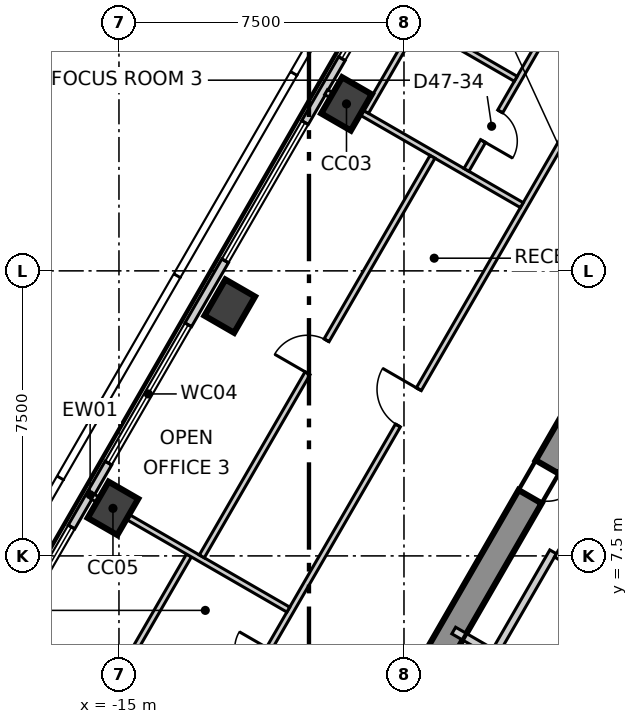
"""IFC4 building model, lengths in metres.
Left out: names, types, materials, properties, quantities, classifications, styles, units other than length and angle.
Written with IfcOpenShell. Run it as: python <this file> out.ifc"""

import sys

from ifc_helpers import new_model, si_unit, direction, frame, frame_2d, origin, origin_2d, place, context, subcontext, project, spatial, polyline, rectangle, outline, extrude, element, fill, save


model = new_model("IFC4")
c1 = context("Model", 3, precision=1e-05, world=origin(), true_north=direction((0.0, 1.0)))
c2 = subcontext(c1, "Body", "Model", "MODEL_VIEW")
j1 = project(units=[si_unit("LENGTHUNIT", "METRE"), si_unit("PLANEANGLEUNIT", "RADIAN")], contexts=[c1])
p1 = place(None, origin())
s1 = spatial("IfcSite", under=j1, at=p1, CompositionType="ELEMENT")
p2 = place(p1, origin())
s2 = spatial("IfcBuilding", under=s1, at=p2, CompositionType="ELEMENT")
p3 = place(p2, frame((0.0, 0.0, 203.3)))
s3 = spatial("IfcBuildingStorey", under=s2, at=p3, CompositionType="ELEMENT", Elevation=203.3)
p4 = place(p3, frame((-1.703, 13.35, -0.3), z_axis=(0.0, 0.0, 1.0), x_axis=(-0.500011533395, -0.866018744874, 0.0)))
e1 = element("IfcWall", 1, at=p4, inside=s3, PredefinedType="SHEAR", context=c2, shape_type="SweptSolid", body=[
    extrude(outline(polyline([(-0.202, -0.35), (1.782, -0.35), (3.766, -0.35), (5.75, -0.35), (7.734, -0.35), (9.718, -0.35), (11.702, -0.35), (13.686, -0.35), (15.67, -0.35), (17.654, -0.35), (19.638, -0.35), (21.622, -0.35), (21.218, 0.35), (19.307, 0.35), (17.397, 0.35), (15.486, 0.35), (13.576, 0.35), (11.665, 0.35), (9.755, 0.35), (7.844, 0.35), (5.934, 0.35), (4.023, 0.35), (2.113, 0.35), (0.202, 0.35), (-0.202, -0.35)])), origin(), (0.0, 0.0, 1.0), 4.0),
])
p5 = place(p4, frame((10.16, 0.0, 0.3)))
e2 = element("IfcOpeningElement", 2, at=p5, cuts=e1, PredefinedType="OPENING", context=c2, shape_type="SweptSolid", body=[
    extrude(rectangle(XDim=1.1, YDim=2.1, at=frame_2d((0.55, 1.05))), frame((0.0, 0.36, 0.0), z_axis=(0.0, -1.0, 0.0), x_axis=(1.0, 0.0, 0.0)), (0.0, 0.0, 1.0), 0.72),
])
p6 = place(p4, frame((4.055, 0.0, 0.3)))
e3 = element("IfcOpeningElement", 3, at=p6, cuts=e1, PredefinedType="OPENING", context=c2, shape_type="SweptSolid", body=[
    extrude(rectangle(XDim=0.9, YDim=2.1, at=frame_2d((0.45, 1.05))), frame((0.0, 0.36, 0.0), z_axis=(0.0, -1.0, 0.0), x_axis=(1.0, 0.0, 0.0)), (0.0, 0.0, 1.0), 0.72),
])
for number, where, z_axis, x_axis in (
    (4, (-9.013, 19.393, -0.3), (0.0, 0.0, 1.0), (0.5, 0.866, 0.0)),
    (5, (-12.085, 14.072, -0.3), (0.0, 0.0, 1.0), (0.5, 0.866, 0.0)),
    (6, (-15.158, 8.751, -0.3), (0.0, 0.0, 1.0), (0.5, 0.866, 0.0)),
):
    element("IfcColumn", number, at=place(p3, frame(where, z_axis=z_axis, x_axis=x_axis)), inside=s3, PredefinedType="COLUMN", context=c2, shape_type="SweptSolid", body=[
        extrude(rectangle(XDim=1.1, YDim=0.9, at=origin_2d()), origin(), (0.0, 0.0, 1.0), 4.0),
    ])
p7 = place(p3, frame((-2.824, 31.513, 0.0), z_axis=(0.0, 0.0, 1.0), x_axis=(-0.500012324412, -0.866018288165, 0.0)))
e7 = element("IfcWall", 7, at=p7, inside=s3, PredefinedType="ELEMENTEDWALL", context=c2, shape_type="SweptSolid", body=[
    extrude(rectangle(XDim=51.739, YDim=0.2, at=frame_2d((25.87, 0.0))), origin(), (0.0, 0.0, 1.0), 3.7),
])
p8 = place(p7, frame((2.275, 0.0, 0.9)))
e8 = element("IfcOpeningElement", 8, at=p8, cuts=e7, PredefinedType="OPENING", context=c2, shape_type="SweptSolid", body=[
    extrude(rectangle(XDim=4.2, YDim=2.5, at=frame_2d((2.1, 1.25))), frame((0.0, 0.11, 0.0), z_axis=(0.0, -1.0, 0.0), x_axis=(1.0, 0.0, 0.0)), (0.0, 0.0, 1.0), 0.22),
])
p9 = place(p7, frame((8.419, 0.0, 0.9)))
e9 = element("IfcOpeningElement", 9, at=p9, cuts=e7, PredefinedType="OPENING", context=c2, shape_type="SweptSolid", body=[
    extrude(rectangle(XDim=4.2, YDim=2.5, at=frame_2d((2.1, 1.25))), frame((0.0, 0.11, 0.0), z_axis=(0.0, -1.0, 0.0), x_axis=(1.0, 0.0, 0.0)), (0.0, 0.0, 1.0), 0.22),
])
p10 = place(p7, frame((14.563, 0.0, 0.9)))
e10 = element("IfcOpeningElement", 10, at=p10, cuts=e7, PredefinedType="OPENING", context=c2, shape_type="SweptSolid", body=[
    extrude(rectangle(XDim=4.2, YDim=2.5, at=frame_2d((2.1, 1.25))), frame((0.0, 0.11, 0.0), z_axis=(0.0, -1.0, 0.0), x_axis=(1.0, 0.0, 0.0)), (0.0, 0.0, 1.0), 0.22),
])
p11 = place(p7, frame((20.707, 0.0, 0.9)))
e11 = element("IfcOpeningElement", 11, at=p11, cuts=e7, PredefinedType="OPENING", context=c2, shape_type="SweptSolid", body=[
    extrude(rectangle(XDim=4.2, YDim=2.5, at=frame_2d((2.1, 1.25))), frame((0.0, 0.11, 0.0), z_axis=(0.0, -1.0, 0.0), x_axis=(1.0, 0.0, 0.0)), (0.0, 0.0, 1.0), 0.22),
])
p12 = place(p7, frame((26.851, 0.0, 0.9)))
e12 = element("IfcOpeningElement", 12, at=p12, cuts=e7, PredefinedType="OPENING", context=c2, shape_type="SweptSolid", body=[
    extrude(rectangle(XDim=4.2, YDim=2.5, at=frame_2d((2.1, 1.25))), frame((0.0, 0.11, 0.0), z_axis=(0.0, -1.0, 0.0), x_axis=(1.0, 0.0, 0.0)), (0.0, 0.0, 1.0), 0.22),
])
p13 = place(p7, frame((32.995, 0.0, 0.9)))
e13 = element("IfcOpeningElement", 13, at=p13, cuts=e7, PredefinedType="OPENING", context=c2, shape_type="SweptSolid", body=[
    extrude(rectangle(XDim=4.2, YDim=2.5, at=frame_2d((2.1, 1.25))), frame((0.0, 0.11, 0.0), z_axis=(0.0, -1.0, 0.0), x_axis=(1.0, 0.0, 0.0)), (0.0, 0.0, 1.0), 0.22),
])
p14 = place(p7, frame((39.14, 0.0, 0.9)))
e14 = element("IfcOpeningElement", 14, at=p14, cuts=e7, PredefinedType="OPENING", context=c2, shape_type="SweptSolid", body=[
    extrude(rectangle(XDim=4.2, YDim=2.5, at=frame_2d((2.1, 1.25))), frame((0.0, 0.11, 0.0), z_axis=(0.0, -1.0, 0.0), x_axis=(1.0, 0.0, 0.0)), (0.0, 0.0, 1.0), 0.22),
])
p15 = place(p7, frame((45.284, 0.0, 0.9)))
e15 = element("IfcOpeningElement", 15, at=p15, cuts=e7, PredefinedType="OPENING", context=c2, shape_type="SweptSolid", body=[
    extrude(rectangle(XDim=4.2, YDim=2.5, at=frame_2d((2.1, 1.25))), frame((0.0, 0.11, 0.0), z_axis=(0.0, -1.0, 0.0), x_axis=(1.0, 0.0, 0.0)), (0.0, 0.0, 1.0), 0.22),
])
p16 = place(p3, frame((-20.883, -11.97, 0.0), z_axis=(0.0, 0.0, 1.0), x_axis=(0.500006150555, 0.866021852731, 0.0)))
e16 = element("IfcWall", 16, at=p16, inside=s3, PredefinedType="PARTITIONING", context=c2, shape_type="SweptSolid", body=[
    extrude(rectangle(XDim=41.766, YDim=0.15, at=frame_2d((20.883, 0.0))), origin(), (0.0, 0.0, 1.0), 3.7),
])
p17 = place(p16, frame((36.916, 0.0, 0.0)))
e17 = element("IfcOpeningElement", 17, at=p17, cuts=e16, PredefinedType="OPENING", context=c2, shape_type="SweptSolid", body=[
    extrude(rectangle(XDim=1.1, YDim=2.1, at=frame_2d((0.55, 1.05))), frame((0.0, 0.085, 0.0), z_axis=(0.0, -1.0, 0.0), x_axis=(1.0, 0.0, 0.0)), (0.0, 0.0, 1.0), 0.17),
])
p18 = place(p16, frame((26.446, 0.0, 0.0)))
e18 = element("IfcOpeningElement", 18, at=p18, cuts=e16, PredefinedType="OPENING", context=c2, shape_type="SweptSolid", body=[
    extrude(rectangle(XDim=1.1, YDim=2.1, at=frame_2d((0.55, 1.05))), frame((0.0, 0.085, 0.0), z_axis=(0.0, -1.0, 0.0), x_axis=(1.0, 0.0, 0.0)), (0.0, 0.0, 1.0), 0.17),
])
p19 = place(p16, frame((9.757, 0.0, 0.0)))
e19 = element("IfcOpeningElement", 19, at=p19, cuts=e16, PredefinedType="OPENING", context=c2, shape_type="SweptSolid", body=[
    extrude(rectangle(XDim=1.1, YDim=2.1, at=frame_2d((0.55, 1.05))), frame((0.0, 0.085, 0.0), z_axis=(0.0, -1.0, 0.0), x_axis=(1.0, 0.0, 0.0)), (0.0, 0.0, 1.0), 0.17),
])
p20 = place(p16, frame((18.757, 0.0, 0.0)))
e20 = element("IfcOpeningElement", 20, at=p20, cuts=e16, PredefinedType="OPENING", context=c2, shape_type="SweptSolid", body=[
    extrude(rectangle(XDim=0.9, YDim=2.1, at=frame_2d((0.45, 1.05))), frame((0.0, 0.085, 0.0), z_axis=(0.0, -1.0, 0.0), x_axis=(1.0, 0.0, 0.0)), (0.0, 0.0, 1.0), 0.17),
])
p21 = place(p16, frame((15.557, 0.0, 0.0)))
e21 = element("IfcOpeningElement", 21, at=p21, cuts=e16, PredefinedType="OPENING", context=c2, shape_type="SweptSolid", body=[
    extrude(rectangle(XDim=0.9, YDim=2.1, at=frame_2d((0.45, 1.05))), frame((0.0, 0.085, 0.0), z_axis=(0.0, -1.0, 0.0), x_axis=(1.0, 0.0, 0.0)), (0.0, 0.0, 1.0), 0.17),
])
p22 = place(p16, frame((12.657, 0.0, 0.0)))
e22 = element("IfcOpeningElement", 22, at=p22, cuts=e16, PredefinedType="OPENING", context=c2, shape_type="SweptSolid", body=[
    extrude(rectangle(XDim=1.0, YDim=2.1, at=frame_2d((0.5, 1.05))), frame((0.0, 0.085, 0.0), z_axis=(0.0, -1.0, 0.0), x_axis=(1.0, 0.0, 0.0)), (0.0, 0.0, 1.0), 0.17),
])
p23 = place(p16, frame((3.669, 0.0, 0.0)))
e23 = element("IfcOpeningElement", 23, at=p23, cuts=e16, PredefinedType="OPENING", context=c2, shape_type="SweptSolid", body=[
    extrude(rectangle(XDim=1.1, YDim=2.1, at=frame_2d((0.55, 1.05))), frame((0.0, 0.085, 0.0), z_axis=(0.0, -1.0, 0.0), x_axis=(1.0, 0.0, 0.0)), (0.0, 0.0, 1.0), 0.17),
])
p24 = place(p3, frame((-17.521, -0.046, 0.0), z_axis=(0.0, 0.0, 1.0), x_axis=(0.499970334739, 0.866042530354, 0.0)))
e24 = element("IfcWall", 24, at=p24, inside=s3, PredefinedType="PARTITIONING", context=c2, shape_type="SweptSolid", body=[
    extrude(rectangle(XDim=8.725, YDim=0.15, at=frame_2d((4.362, 0.0))), origin(), (0.0, 0.0, 1.0), 3.7),
])
p25 = place(p3, frame((-15.695, 9.061, 0.0), z_axis=(0.0, 0.0, 1.0), x_axis=(0.866016753976, -0.500014981608, 0.0)))
e25 = element("IfcWall", 25, at=p25, inside=s3, PredefinedType="PARTITIONING", context=c2, shape_type="SweptSolid", body=[
    extrude(rectangle(XDim=5.948, YDim=0.15, at=frame_2d((2.974, 0.0))), origin(), (0.0, 0.0, 1.0), 3.2),
])
p26 = place(p3, frame((-9.55, 19.703, 0.0), z_axis=(0.0, 0.0, 1.0), x_axis=(0.866064581528, -0.499932136017, 0.0)))
e26 = element("IfcWall", 26, at=p26, inside=s3, PredefinedType="PARTITIONING", context=c2, shape_type="SweptSolid", body=[
    extrude(rectangle(XDim=5.947, YDim=0.15, at=frame_2d((2.973, 0.0))), origin(), (0.0, 0.0, 1.0), 3.7),
])
p27 = place(p3, frame((-12.82, 7.488, 0.0), z_axis=(0.0, 0.0, 1.0), x_axis=(0.500060781096, 0.865990308958, 0.0)))
e27 = element("IfcWall", 27, at=p27, inside=s3, PredefinedType="PARTITIONING", context=c2, shape_type="SweptSolid", body=[
    extrude(rectangle(XDim=12.139, YDim=0.15, at=frame_2d((6.069, 0.0))), origin(), (0.0, 0.0, 1.0), 3.7),
])
p28 = place(p27, frame((5.564, 0.0, 0.0)))
e28 = element("IfcOpeningElement", 28, at=p28, cuts=e27, PredefinedType="OPENING", context=c2, shape_type="SweptSolid", body=[
    extrude(rectangle(XDim=1.0, YDim=2.1, at=frame_2d((0.5, 1.05))), frame((0.0, 0.085, 0.0), z_axis=(0.0, -1.0, 0.0), x_axis=(1.0, 0.0, 0.0)), (0.0, 0.0, 1.0), 0.17),
])
p29 = place(p3, frame((-5.856, 17.657, 0.0), z_axis=(0.0, 0.0, 1.0), x_axis=(0.499917542299, 0.866073005526, 0.0)))
e29 = element("IfcWall", 29, at=p29, inside=s3, PredefinedType="PARTITIONING", context=c2, shape_type="SweptSolid", body=[
    extrude(rectangle(XDim=5.525, YDim=0.15, at=frame_2d((2.762, 0.0))), origin(), (0.0, 0.0, 1.0), 3.7),
])
p30 = place(p29, frame((0.875, 0.0, 0.0)))
e30 = element("IfcOpeningElement", 30, at=p30, cuts=e29, PredefinedType="OPENING", context=c2, shape_type="SweptSolid", body=[
    extrude(rectangle(XDim=0.9, YDim=2.1, at=frame_2d((0.45, 1.05))), frame((0.0, 0.085, 0.0), z_axis=(0.0, -1.0, 0.0), x_axis=(1.0, 0.0, 0.0)), (0.0, 0.0, 1.0), 0.17),
])
p31 = place(p3, frame((-8.498, 19.182, 0.0), z_axis=(0.0, 0.0, 1.0), x_axis=(0.499983534837, 0.866034909742, 0.0)))
e31 = element("IfcWall", 31, at=p31, inside=s3, PredefinedType="PARTITIONING", context=c2, shape_type="SweptSolid", body=[
    extrude(rectangle(XDim=5.45, YDim=0.15, at=frame_2d((2.725, 0.0))), origin(), (0.0, 0.0, 1.0), 3.7),
])
p32 = place(p3, frame((-7.071, 21.505, 0.0), z_axis=(0.0, 0.0, 1.0), x_axis=(0.865929066901, -0.500166823267, 0.0)))
e32 = element("IfcWall", 32, at=p32, inside=s3, PredefinedType="PARTITIONING", context=c2, shape_type="SweptSolid", body=[
    extrude(rectangle(XDim=2.901, YDim=0.15, at=frame_2d((1.45, 0.0))), origin(), (0.0, 0.0, 1.0), 3.7),
])
p33 = place(p3, frame((-6.191, 5.537, 0.0), z_axis=(0.0, 0.0, 1.0), x_axis=(0.866052607023, -0.499952879648, 0.0)))
e33 = element("IfcWall", 33, at=p33, inside=s3, PredefinedType="SOLIDWALL", context=c2, shape_type="SweptSolid", body=[
    extrude(rectangle(XDim=3.332, YDim=0.2, at=frame_2d((1.666, 0.0))), origin(), (0.0, 0.0, 1.0), 3.7),
])
p34 = place(p33, frame((1.83, 0.0, 0.0)))
e34 = element("IfcOpeningElement", 34, at=p34, cuts=e33, PredefinedType="OPENING", context=c2, shape_type="SweptSolid", body=[
    extrude(rectangle(XDim=0.9, YDim=2.1, at=frame_2d((0.45, 1.05))), frame((0.0, 0.11, 0.0), z_axis=(0.0, -1.0, 0.0), x_axis=(1.0, 0.0, 0.0)), (0.0, 0.0, 1.0), 0.22),
])
p35 = place(p3, frame((-5.076, 5.009, 0.0), z_axis=(0.0, 0.0, 1.0), x_axis=(0.50002537861, 0.866010750942, 0.0)))
e35 = element("IfcWall", 35, at=p35, inside=s3, PredefinedType="SOLIDWALL", context=c2, shape_type="SweptSolid", body=[
    extrude(rectangle(XDim=3.0, YDim=0.2, at=frame_2d((1.5, 0.0))), origin(), (0.0, 0.0, 1.0), 3.7),
])
p36 = place(p3, frame((-3.489, 7.557, 0.0), z_axis=(0.0, 0.0, 1.0), x_axis=(0.866010750942, -0.50002537861, 0.0)))
e36 = element("IfcWall", 36, at=p36, inside=s3, PredefinedType="SOLIDWALL", context=c2, shape_type="SweptSolid", body=[
    extrude(rectangle(XDim=2.0, YDim=0.2, at=frame_2d((1.0, 0.0))), origin(), (0.0, 0.0, 1.0), 3.7),
])
p37 = place(p9, origin())
e37 = element("IfcWindow", 37, at=p37, inside=s3, PartitioningType="SINGLE_PANEL", PredefinedType="WINDOW", context=c2, shape_type="SweptSolid", body=[
    extrude(rectangle(XDim=4.2, YDim=2.5, at=frame_2d((2.1, 1.25))), frame((0.0, 0.03, 0.0), z_axis=(0.0, -1.0, 0.0), x_axis=(1.0, 0.0, 0.0)), (0.0, 0.0, 1.0), 0.06),
])
fill(e9, e37)
p38 = place(p10, origin())
e38 = element("IfcWindow", 38, at=p38, inside=s3, PartitioningType="SINGLE_PANEL", PredefinedType="WINDOW", context=c2, shape_type="SweptSolid", body=[
    extrude(rectangle(XDim=4.2, YDim=2.5, at=frame_2d((2.1, 1.25))), frame((0.0, 0.03, 0.0), z_axis=(0.0, -1.0, 0.0), x_axis=(1.0, 0.0, 0.0)), (0.0, 0.0, 1.0), 0.06),
])
fill(e10, e38)
p39 = place(p11, origin())
e39 = element("IfcWindow", 39, at=p39, inside=s3, PartitioningType="SINGLE_PANEL", PredefinedType="WINDOW", context=c2, shape_type="SweptSolid", body=[
    extrude(rectangle(XDim=4.2, YDim=2.5, at=frame_2d((2.1, 1.25))), frame((0.0, 0.03, 0.0), z_axis=(0.0, -1.0, 0.0), x_axis=(1.0, 0.0, 0.0)), (0.0, 0.0, 1.0), 0.06),
])
fill(e11, e39)
p40 = place(p12, origin())
e40 = element("IfcWindow", 40, at=p40, inside=s3, PartitioningType="SINGLE_PANEL", PredefinedType="WINDOW", context=c2, shape_type="SweptSolid", body=[
    extrude(rectangle(XDim=4.2, YDim=2.5, at=frame_2d((2.1, 1.25))), frame((0.0, 0.03, 0.0), z_axis=(0.0, -1.0, 0.0), x_axis=(1.0, 0.0, 0.0)), (0.0, 0.0, 1.0), 0.06),
])
fill(e12, e40)
p41 = place(p30, origin())
e41 = element("IfcDoor", 41, at=p41, inside=s3, OperationType="SINGLE_SWING_LEFT", PredefinedType="DOOR", context=c2, shape_type="SweptSolid", body=[
    extrude(rectangle(XDim=0.9, YDim=2.1, at=frame_2d((0.45, 1.05))), frame((0.0, 0.025, 0.0), z_axis=(0.0, -1.0, 0.0), x_axis=(1.0, 0.0, 0.0)), (0.0, 0.0, 1.0), 0.05),
])
fill(e30, e41)
p42 = place(p18, origin())
e42 = element("IfcDoor", 42, at=p42, inside=s3, OperationType="SINGLE_SWING_LEFT", PredefinedType="DOOR", context=c2, shape_type="SweptSolid", body=[
    extrude(rectangle(XDim=1.1, YDim=2.1, at=frame_2d((0.55, 1.05))), frame((0.0, 0.025, 0.0), z_axis=(0.0, -1.0, 0.0), x_axis=(1.0, 0.0, 0.0)), (0.0, 0.0, 1.0), 0.05),
])
fill(e18, e42)
p43 = place(p28, origin())
e43 = element("IfcDoor", 43, at=p43, inside=s3, OperationType="SINGLE_SWING_RIGHT", PredefinedType="DOOR", context=c2, shape_type="SweptSolid", body=[
    extrude(rectangle(XDim=1.0, YDim=2.1, at=frame_2d((0.5, 1.05))), frame((0.0, 0.025, 0.0), z_axis=(0.0, -1.0, 0.0), x_axis=(1.0, 0.0, 0.0)), (0.0, 0.0, 1.0), 0.05),
])
fill(e28, e43)
p44 = place(p6, origin())
e44 = element("IfcDoor", 44, at=p44, inside=s3, OperationType="SINGLE_SWING_RIGHT", PredefinedType="DOOR", context=c2, shape_type="SweptSolid", body=[
    extrude(rectangle(XDim=0.9, YDim=2.1, at=frame_2d((0.45, 1.05))), frame((0.0, 0.025, 0.0), z_axis=(0.0, -1.0, 0.0), x_axis=(1.0, 0.0, 0.0)), (0.0, 0.0, 1.0), 0.05),
])
fill(e3, e44)
save(model, sys.argv[1])
